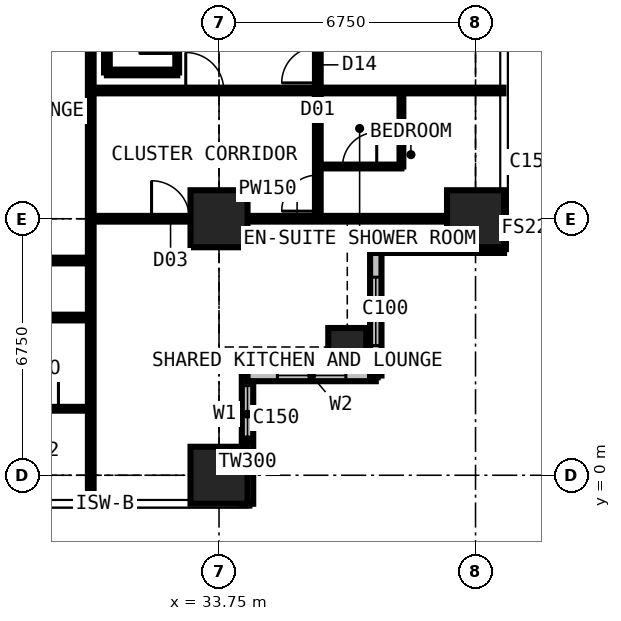
"""IFC4 building model, lengths in metres.
Left out: names, types, materials, properties, quantities, classifications, styles, units other than length and angle.
Written with IfcOpenShell. Run it as: python <this file> out.ifc"""

import sys

from ifc_helpers import new_model, si_unit, direction, frame, frame_2d, origin, origin_2d, place, context, subcontext, project, spatial, rectangle, extrude, element, fill, save


model = new_model("IFC4")
c1 = context("Model", 3, precision=1e-05, world=origin(), true_north=direction((0.0, 1.0)))
c2 = subcontext(c1, "Body", "Model", "MODEL_VIEW")
j1 = project(units=[si_unit("LENGTHUNIT", "METRE"), si_unit("PLANEANGLEUNIT", "RADIAN")], contexts=[c1])
p1 = place(None, origin())
s1 = spatial("IfcSite", under=j1, at=p1, CompositionType="ELEMENT")
p2 = place(p1, origin())
s2 = spatial("IfcBuilding", under=s1, at=p2, CompositionType="ELEMENT")
p3 = place(p2, frame((0.0, 0.0, 126.9)))
s3 = spatial("IfcBuildingStorey", under=s2, at=p3, CompositionType="ELEMENT", Elevation=126.9)
for number, where, z_axis, x_axis in (
    (1, (33.75, 0.0, 0.0), (0.0, 0.0, 1.0), (1.0, 0.0, 0.0)),
    (2, (33.75, 6.75, 0.0), (0.0, 0.0, 1.0), (1.0, 0.0, 0.0)),
):
    element("IfcColumn", number, at=place(p3, frame(where, z_axis=z_axis, x_axis=x_axis)), inside=s3, PredefinedType="COLUMN", context=c2, shape_type="SweptSolid", body=[
        extrude(rectangle(XDim=1.5, YDim=1.5, at=origin_2d()), origin(), (0.0, 0.0, 1.0), 3.6),
    ])
p4 = place(p3, frame((37.125, 3.375, 0.0), z_axis=(0.0, 0.0, 1.0), x_axis=(1.0, 0.0, 0.0)))
e3 = element("IfcColumn", 3, at=p4, inside=s3, PredefinedType="COLUMN", context=c2, shape_type="SweptSolid", body=[
    extrude(rectangle(XDim=1.0, YDim=1.0, at=origin_2d()), origin(), (0.0, 0.0, 1.0), 3.6),
])
p5 = place(p3, frame((40.5, 6.75, 0.0), z_axis=(0.0, 0.0, 1.0), x_axis=(1.0, 0.0, 0.0)))
e4 = element("IfcColumn", 4, at=p5, inside=s3, PredefinedType="COLUMN", context=c2, shape_type="SweptSolid", body=[
    extrude(rectangle(XDim=1.5, YDim=1.5, at=origin_2d()), origin(), (0.0, 0.0, 1.0), 3.6),
])
p6 = place(p3, frame((34.5, -0.75, 0.0), z_axis=(0.0, 0.0, 1.0), x_axis=(0.0, 1.0, 0.0)))
e5 = element("IfcWall", 5, at=p6, inside=s3, PredefinedType="SOLIDWALL", context=c2, shape_type="SweptSolid", body=[
    extrude(rectangle(XDim=3.375, YDim=0.3, at=frame_2d((1.688, 0.0))), origin(), (0.0, 0.0, 1.0), 3.375),
])
p7 = place(p6, frame((1.607, 0.0, 0.9)))
e6 = element("IfcOpeningElement", 6, at=p7, cuts=e5, PredefinedType="OPENING", context=c2, shape_type="SweptSolid", body=[
    extrude(rectangle(XDim=1.5, YDim=1.8, at=frame_2d((0.75, 0.9))), frame((0.0, 0.16, 0.0), z_axis=(0.0, -1.0, 0.0), x_axis=(1.0, 0.0, 0.0)), (0.0, 0.0, 1.0), 0.32),
])
p8 = place(p3, frame((34.5, 2.625, 0.0), z_axis=(0.0, 0.0, 1.0), x_axis=(1.0, 0.0, 0.0)))
e7 = element("IfcWall", 7, at=p8, inside=s3, PredefinedType="SOLIDWALL", context=c2, shape_type="SweptSolid", body=[
    extrude(rectangle(XDim=3.375, YDim=0.3, at=frame_2d((1.688, 0.0))), origin(), (0.0, 0.0, 1.0), 3.375),
])
p9 = place(p8, frame((0.788, 0.0, 0.6)))
e8 = element("IfcOpeningElement", 8, at=p9, cuts=e7, PredefinedType="OPENING", context=c2, shape_type="SweptSolid", body=[
    extrude(rectangle(XDim=1.8, YDim=2.1, at=frame_2d((0.9, 1.05))), frame((0.0, 0.16, 0.0), z_axis=(0.0, -1.0, 0.0), x_axis=(1.0, 0.0, 0.0)), (0.0, 0.0, 1.0), 0.32),
])
p10 = place(p3, frame((37.875, 2.625, 0.0), z_axis=(0.0, 0.0, 1.0), x_axis=(0.0, 1.0, 0.0)))
e9 = element("IfcWall", 9, at=p10, inside=s3, PredefinedType="SOLIDWALL", context=c2, shape_type="SweptSolid", body=[
    extrude(rectangle(XDim=3.375, YDim=0.3, at=frame_2d((1.688, 0.0))), origin(), (0.0, 0.0, 1.0), 3.375),
])
p11 = place(p10, frame((0.788, 0.0, 0.6)))
e10 = element("IfcOpeningElement", 10, at=p11, cuts=e9, PredefinedType="OPENING", context=c2, shape_type="SweptSolid", body=[
    extrude(rectangle(XDim=1.8, YDim=2.1, at=frame_2d((0.9, 1.05))), frame((0.0, 0.16, 0.0), z_axis=(0.0, -1.0, 0.0), x_axis=(1.0, 0.0, 0.0)), (0.0, 0.0, 1.0), 0.32),
])
p12 = place(p3, frame((37.875, 6.0, 0.0), z_axis=(0.0, 0.0, 1.0), x_axis=(1.0, 0.0, 0.0)))
e11 = element("IfcWall", 11, at=p12, inside=s3, PredefinedType="SOLIDWALL", context=c2, shape_type="SweptSolid", body=[
    extrude(rectangle(XDim=3.375, YDim=0.3, at=frame_2d((1.688, 0.0))), origin(), (0.0, 0.0, 1.0), 3.375),
])
p13 = place(p12, frame((0.268, 0.0, 0.9)))
e12 = element("IfcOpeningElement", 12, at=p13, cuts=e11, PredefinedType="OPENING", context=c2, shape_type="SweptSolid", body=[
    extrude(rectangle(XDim=1.5, YDim=1.8, at=frame_2d((0.75, 0.9))), frame((0.0, 0.16, 0.0), z_axis=(0.0, -1.0, 0.0), x_axis=(1.0, 0.0, 0.0)), (0.0, 0.0, 1.0), 0.32),
])
p14 = place(p3, frame((6.75, 4.15, 0.0), z_axis=(0.0, 0.0, 1.0), x_axis=(1.0, 0.0, 0.0)))
e13 = element("IfcWall", 13, at=p14, inside=s3, PredefinedType="PARTITIONING", context=c2, shape_type="SweptSolid", body=[
    extrude(rectangle(XDim=23.625, YDim=0.15, at=frame_2d((11.812, 0.0))), origin(), (0.0, 0.0, 1.0), 3.375),
])
p15 = place(p14, frame((2.85, 0.0, 0.0)))
e14 = element("IfcOpeningElement", 14, at=p15, cuts=e13, PredefinedType="OPENING", context=c2, shape_type="SweptSolid", body=[
    extrude(rectangle(XDim=1.0, YDim=2.2, at=frame_2d((0.5, 1.1))), frame((0.0, 0.085, 0.0), z_axis=(0.0, -1.0, 0.0), x_axis=(1.0, 0.0, 0.0)), (0.0, 0.0, 1.0), 0.17),
])
p16 = place(p14, frame((18.475, 0.0, 0.0)))
e15 = element("IfcOpeningElement", 15, at=p16, cuts=e13, PredefinedType="OPENING", context=c2, shape_type="SweptSolid", body=[
    extrude(rectangle(XDim=0.95, YDim=2.2, at=frame_2d((0.475, 1.1))), frame((0.0, 0.085, 0.0), z_axis=(0.0, -1.0, 0.0), x_axis=(1.0, 0.0, 0.0)), (0.0, 0.0, 1.0), 0.17),
])
p17 = place(p14, frame((11.725, 0.0, 0.0)))
e16 = element("IfcOpeningElement", 16, at=p17, cuts=e13, PredefinedType="OPENING", context=c2, shape_type="SweptSolid", body=[
    extrude(rectangle(XDim=0.95, YDim=2.2, at=frame_2d((0.475, 1.1))), frame((0.0, 0.085, 0.0), z_axis=(0.0, -1.0, 0.0), x_axis=(1.0, 0.0, 0.0)), (0.0, 0.0, 1.0), 0.17),
])
p18 = place(p14, frame((6.95, 0.0, 0.0)))
e17 = element("IfcOpeningElement", 17, at=p18, cuts=e13, PredefinedType="OPENING", context=c2, shape_type="SweptSolid", body=[
    extrude(rectangle(XDim=0.95, YDim=2.2, at=frame_2d((0.475, 1.1))), frame((0.0, 0.085, 0.0), z_axis=(0.0, -1.0, 0.0), x_axis=(1.0, 0.0, 0.0)), (0.0, 0.0, 1.0), 0.17),
])
p19 = place(p3, frame((22.988, 5.65, 0.0), z_axis=(0.0, 0.0, 1.0), x_axis=(1.0, 0.0, 0.0)))
e18 = element("IfcWall", 18, at=p19, inside=s3, PredefinedType="PARTITIONING", context=c2, shape_type="SweptSolid", body=[
    extrude(rectangle(XDim=7.387, YDim=0.15, at=frame_2d((3.694, 0.0))), origin(), (0.0, 0.0, 1.0), 3.375),
])
p20 = place(p19, frame((2.3, 0.0, 0.0)))
e19 = element("IfcOpeningElement", 19, at=p20, cuts=e18, PredefinedType="OPENING", context=c2, shape_type="SweptSolid", body=[
    extrude(rectangle(XDim=0.95, YDim=2.2, at=frame_2d((0.475, 1.1))), frame((0.0, 0.085, 0.0), z_axis=(0.0, -1.0, 0.0), x_axis=(1.0, 0.0, 0.0)), (0.0, 0.0, 1.0), 0.17),
])
p21 = place(p3, frame((27.775, 1.75, 0.0), z_axis=(0.0, 0.0, 1.0), x_axis=(1.0, 0.0, 0.0)))
e20 = element("IfcWall", 20, at=p21, inside=s3, PredefinedType="PARTITIONING", context=c2, shape_type="SweptSolid", body=[
    extrude(rectangle(XDim=2.6, YDim=0.1, at=frame_2d((1.3, 0.0))), origin(), (0.0, 0.0, 1.0), 3.375),
])
p22 = place(p21, frame((0.85, 0.0, 0.0)))
e21 = element("IfcOpeningElement", 21, at=p22, cuts=e20, PredefinedType="OPENING", context=c2, shape_type="SweptSolid", body=[
    extrude(rectangle(XDim=0.9, YDim=2.2, at=frame_2d((0.45, 1.1))), frame((0.0, 0.06, 0.0), z_axis=(0.0, -1.0, 0.0), x_axis=(1.0, 0.0, 0.0)), (0.0, 0.0, 1.0), 0.12),
])
p23 = place(p3, frame((30.375, -0.734, 0.0), z_axis=(0.0, 0.0, 1.0), x_axis=(0.0, 1.0, 0.0)))
e22 = element("IfcWall", 22, at=p23, inside=s3, PredefinedType="PARTITIONING", context=c2, shape_type="SweptSolid", body=[
    extrude(rectangle(XDim=12.034, YDim=0.15, at=frame_2d((6.017, 0.0))), origin(), (0.0, 0.0, 1.0), 3.375),
])
p24 = place(p3, frame((30.375, 6.75, 0.0), z_axis=(0.0, 0.0, 1.0), x_axis=(1.0, 0.0, 0.0)))
e23 = element("IfcWall", 23, at=p24, inside=s3, PredefinedType="PARTITIONING", context=c2, shape_type="SweptSolid", body=[
    extrude(rectangle(XDim=10.859, YDim=0.15, at=frame_2d((5.429, 0.0))), origin(), (0.0, 0.0, 1.0), 2.877),
])
p25 = place(p24, frame((1.6, 0.0, 0.0)))
e24 = element("IfcOpeningElement", 24, at=p25, cuts=e23, PredefinedType="OPENING", context=c2, shape_type="SweptSolid", body=[
    extrude(rectangle(XDim=1.0, YDim=2.2, at=frame_2d((0.5, 1.1))), frame((0.0, 0.085, 0.0), z_axis=(0.0, -1.0, 0.0), x_axis=(1.0, 0.0, 0.0)), (0.0, 0.0, 1.0), 0.17),
])
p26 = place(p3, frame((30.375, 10.125, 0.0), z_axis=(0.0, 0.0, 1.0), x_axis=(1.0, 0.0, 0.0)))
e25 = element("IfcWall", 25, at=p26, inside=s3, PredefinedType="PARTITIONING", context=c2, shape_type="SweptSolid", body=[
    extrude(rectangle(XDim=10.859, YDim=0.15, at=frame_2d((5.429, 0.0))), origin(), (0.0, 0.0, 1.0), 3.375),
])
p27 = place(p26, frame((2.5, 0.0, 0.0)))
e26 = element("IfcOpeningElement", 26, at=p27, cuts=e25, PredefinedType="OPENING", context=c2, shape_type="SweptSolid", body=[
    extrude(rectangle(XDim=1.0, YDim=2.2, at=frame_2d((0.5, 1.1))), frame((0.0, 0.085, 0.0), z_axis=(0.0, -1.0, 0.0), x_axis=(1.0, 0.0, 0.0)), (0.0, 0.0, 1.0), 0.17),
])
p28 = place(p3, frame((30.8, 10.6, 0.0), z_axis=(0.0, 0.0, 1.0), x_axis=(0.0, 1.0, 0.0)))
e27 = element("IfcWall", 27, at=p28, inside=s3, PredefinedType="PARTITIONING", context=c2, shape_type="SweptSolid", body=[
    extrude(rectangle(XDim=0.7, YDim=0.15, at=frame_2d((0.35, 0.0))), origin(), (0.0, 0.0, 1.0), 3.375),
])
p29 = place(p3, frame((30.8, 10.6, 0.0), z_axis=(0.0, 0.0, 1.0), x_axis=(1.0, 0.0, 0.0)))
e28 = element("IfcWall", 28, at=p29, inside=s3, PredefinedType="PARTITIONING", context=c2, shape_type="SweptSolid", body=[
    extrude(rectangle(XDim=1.85, YDim=0.15, at=frame_2d((0.925, 0.0))), origin(), (0.0, 0.0, 1.0), 3.375),
])
p30 = place(p3, frame((32.65, 10.6, 0.0), z_axis=(0.0, 0.0, 1.0), x_axis=(0.0, 1.0, 0.0)))
e29 = element("IfcWall", 29, at=p30, inside=s3, PredefinedType="SHEAR", context=c2, shape_type="SweptSolid", body=[
    extrude(rectangle(XDim=9.3, YDim=0.1, at=frame_2d((4.65, 0.0))), origin(), (0.0, 0.0, 1.0), 3.375),
])
p31 = place(p30, frame((0.5, 0.0, 0.0)))
e30 = element("IfcOpeningElement", 30, at=p31, cuts=e29, PredefinedType="OPENING", context=c2, shape_type="SweptSolid", body=[
    extrude(rectangle(XDim=1.0, YDim=2.2, at=frame_2d((0.5, 1.1))), frame((0.0, 0.06, 0.0), z_axis=(0.0, -1.0, 0.0), x_axis=(1.0, 0.0, 0.0)), (0.0, 0.0, 1.0), 0.12),
])
p32 = place(p3, frame((36.35, 6.75, 0.0), z_axis=(0.0, 0.0, 1.0), x_axis=(0.0, 1.0, 0.0)))
e31 = element("IfcWall", 31, at=p32, inside=s3, PredefinedType="PARTITIONING", context=c2, shape_type="SweptSolid", body=[
    extrude(rectangle(XDim=20.25, YDim=0.15, at=frame_2d((10.125, 0.0))), origin(), (0.0, 0.0, 1.0), 3.375),
])
p33 = place(p32, frame((0.2, 0.0, 0.0)))
e32 = element("IfcOpeningElement", 32, at=p33, cuts=e31, PredefinedType="OPENING", context=c2, shape_type="SweptSolid", body=[
    extrude(rectangle(XDim=0.95, YDim=2.2, at=frame_2d((0.475, 1.1))), frame((0.0, 0.085, 0.0), z_axis=(0.0, -1.0, 0.0), x_axis=(1.0, 0.0, 0.0)), (0.0, 0.0, 1.0), 0.17),
])
p34 = place(p32, frame((3.575, 0.0, 0.0)))
e33 = element("IfcOpeningElement", 33, at=p34, cuts=e31, PredefinedType="OPENING", context=c2, shape_type="SweptSolid", body=[
    extrude(rectangle(XDim=0.95, YDim=2.2, at=frame_2d((0.475, 1.1))), frame((0.0, 0.085, 0.0), z_axis=(0.0, -1.0, 0.0), x_axis=(1.0, 0.0, 0.0)), (0.0, 0.0, 1.0), 0.17),
])
p35 = place(p32, frame((7.0, 0.0, 0.0)))
e34 = element("IfcOpeningElement", 34, at=p35, cuts=e31, PredefinedType="OPENING", context=c2, shape_type="SweptSolid", body=[
    extrude(rectangle(XDim=0.95, YDim=2.2, at=frame_2d((0.475, 1.1))), frame((0.0, 0.085, 0.0), z_axis=(0.0, -1.0, 0.0), x_axis=(1.0, 0.0, 0.0)), (0.0, 0.0, 1.0), 0.17),
])
p36 = place(p32, frame((10.375, 0.0, 0.0)))
e35 = element("IfcOpeningElement", 35, at=p36, cuts=e31, PredefinedType="OPENING", context=c2, shape_type="SweptSolid", body=[
    extrude(rectangle(XDim=0.95, YDim=2.2, at=frame_2d((0.475, 1.1))), frame((0.0, 0.085, 0.0), z_axis=(0.0, -1.0, 0.0), x_axis=(1.0, 0.0, 0.0)), (0.0, 0.0, 1.0), 0.17),
])
p37 = place(p32, frame((13.75, 0.0, 0.0)))
e36 = element("IfcOpeningElement", 36, at=p37, cuts=e31, PredefinedType="OPENING", context=c2, shape_type="SweptSolid", body=[
    extrude(rectangle(XDim=0.95, YDim=2.2, at=frame_2d((0.475, 1.1))), frame((0.0, 0.085, 0.0), z_axis=(0.0, -1.0, 0.0), x_axis=(1.0, 0.0, 0.0)), (0.0, 0.0, 1.0), 0.17),
])
p38 = place(p32, frame((17.125, 0.0, 0.0)))
e37 = element("IfcOpeningElement", 37, at=p38, cuts=e31, PredefinedType="OPENING", context=c2, shape_type="SweptSolid", body=[
    extrude(rectangle(XDim=0.95, YDim=2.2, at=frame_2d((0.475, 1.1))), frame((0.0, 0.085, 0.0), z_axis=(0.0, -1.0, 0.0), x_axis=(1.0, 0.0, 0.0)), (0.0, 0.0, 1.0), 0.17),
])
p39 = place(p3, frame((36.35, 8.125, 0.0), z_axis=(0.0, 0.0, 1.0), x_axis=(1.0, 0.0, 0.0)))
e38 = element("IfcWall", 38, at=p39, inside=s3, PredefinedType="PARTITIONING", context=c2, shape_type="SweptSolid", body=[
    extrude(rectangle(XDim=2.2, YDim=0.1, at=frame_2d((1.1, 0.0))), origin(), (0.0, 0.0, 1.0), 3.375),
])
p40 = place(p39, frame((0.65, 0.0, 0.0)))
e39 = element("IfcOpeningElement", 39, at=p40, cuts=e38, PredefinedType="OPENING", context=c2, shape_type="SweptSolid", body=[
    extrude(rectangle(XDim=0.9, YDim=2.2, at=frame_2d((0.45, 1.1))), frame((0.0, 0.06, 0.0), z_axis=(0.0, -1.0, 0.0), x_axis=(1.0, 0.0, 0.0)), (0.0, 0.0, 1.0), 0.12),
])
p41 = place(p3, frame((38.55, 8.125, 0.0), z_axis=(0.0, 0.0, 1.0), x_axis=(0.0, 1.0, 0.0)))
e40 = element("IfcWall", 40, at=p41, inside=s3, PredefinedType="PARTITIONING", context=c2, shape_type="SweptSolid", body=[
    extrude(rectangle(XDim=2.0, YDim=0.1, at=frame_2d((1.0, 0.0))), origin(), (0.0, 0.0, 1.0), 3.375),
])
p42 = place(p7, origin())
e41 = element("IfcWindow", 41, at=p42, inside=s3, PartitioningType="SINGLE_PANEL", PredefinedType="WINDOW", context=c2, shape_type="SweptSolid", body=[
    extrude(rectangle(XDim=1.5, YDim=1.8, at=frame_2d((0.75, 0.9))), frame((0.0, 0.03, 0.0), z_axis=(0.0, -1.0, 0.0), x_axis=(1.0, 0.0, 0.0)), (0.0, 0.0, 1.0), 0.06),
])
fill(e6, e41)
p43 = place(p9, origin())
e42 = element("IfcWindow", 42, at=p43, inside=s3, PartitioningType="SINGLE_PANEL", PredefinedType="WINDOW", context=c2, shape_type="SweptSolid", body=[
    extrude(rectangle(XDim=1.8, YDim=2.1, at=frame_2d((0.9, 1.05))), frame((0.0, 0.03, 0.0), z_axis=(0.0, -1.0, 0.0), x_axis=(1.0, 0.0, 0.0)), (0.0, 0.0, 1.0), 0.06),
])
fill(e8, e42)
p44 = place(p11, origin())
e43 = element("IfcWindow", 43, at=p44, inside=s3, PartitioningType="SINGLE_PANEL", PredefinedType="WINDOW", context=c2, shape_type="SweptSolid", body=[
    extrude(rectangle(XDim=1.8, YDim=2.1, at=frame_2d((0.9, 1.05))), frame((0.0, 0.03, 0.0), z_axis=(0.0, -1.0, 0.0), x_axis=(1.0, 0.0, 0.0)), (0.0, 0.0, 1.0), 0.06),
])
fill(e10, e43)
p45 = place(p13, origin())
e44 = element("IfcWindow", 44, at=p45, inside=s3, PartitioningType="SINGLE_PANEL", PredefinedType="WINDOW", context=c2, shape_type="SweptSolid", body=[
    extrude(rectangle(XDim=1.5, YDim=1.8, at=frame_2d((0.75, 0.9))), frame((0.0, 0.03, 0.0), z_axis=(0.0, -1.0, 0.0), x_axis=(1.0, 0.0, 0.0)), (0.0, 0.0, 1.0), 0.06),
])
fill(e12, e44)
p46 = place(p22, origin())
e45 = element("IfcDoor", 45, at=p46, inside=s3, OperationType="SINGLE_SWING_RIGHT", PredefinedType="DOOR", context=c2, shape_type="SweptSolid", body=[
    extrude(rectangle(XDim=0.9, YDim=2.2, at=frame_2d((0.45, 1.1))), frame((0.0, 0.025, 0.0), z_axis=(0.0, -1.0, 0.0), x_axis=(1.0, 0.0, 0.0)), (0.0, 0.0, 1.0), 0.05),
])
fill(e21, e45)
p47 = place(p25, origin())
e46 = element("IfcDoor", 46, at=p47, inside=s3, OperationType="SINGLE_SWING_LEFT", PredefinedType="DOOR", context=c2, shape_type="SweptSolid", body=[
    extrude(rectangle(XDim=1.0, YDim=2.2, at=frame_2d((0.5, 1.1))), frame((0.0, 0.025, 0.0), z_axis=(0.0, -1.0, 0.0), x_axis=(1.0, 0.0, 0.0)), (0.0, 0.0, 1.0), 0.05),
])
fill(e24, e46)
p48 = place(p33, origin())
e47 = element("IfcDoor", 47, at=p48, inside=s3, OperationType="SINGLE_SWING_LEFT", PredefinedType="DOOR", context=c2, shape_type="SweptSolid", body=[
    extrude(rectangle(XDim=0.95, YDim=2.2, at=frame_2d((0.475, 1.1))), frame((0.0, 0.025, 0.0), z_axis=(0.0, -1.0, 0.0), x_axis=(1.0, 0.0, 0.0)), (0.0, 0.0, 1.0), 0.05),
])
fill(e32, e47)
p49 = place(p40, origin())
e48 = element("IfcDoor", 48, at=p49, inside=s3, OperationType="SINGLE_SWING_RIGHT", PredefinedType="DOOR", context=c2, shape_type="SweptSolid", body=[
    extrude(rectangle(XDim=0.9, YDim=2.2, at=frame_2d((0.45, 1.1))), frame((0.0, 0.025, 0.0), z_axis=(0.0, -1.0, 0.0), x_axis=(1.0, 0.0, 0.0)), (0.0, 0.0, 1.0), 0.05),
])
fill(e39, e48)
p50 = place(p27, origin())
e49 = element("IfcDoor", 49, at=p50, inside=s3, OperationType="SINGLE_SWING_LEFT", PredefinedType="DOOR", context=c2, shape_type="SweptSolid", body=[
    extrude(rectangle(XDim=1.0, YDim=2.2, at=frame_2d((0.5, 1.1))), frame((0.0, 0.025, 0.0), z_axis=(0.0, -1.0, 0.0), x_axis=(1.0, 0.0, 0.0)), (0.0, 0.0, 1.0), 0.05),
])
fill(e26, e49)
p51 = place(p34, origin())
e50 = element("IfcDoor", 50, at=p51, inside=s3, OperationType="SINGLE_SWING_LEFT", PredefinedType="DOOR", context=c2, shape_type="SweptSolid", body=[
    extrude(rectangle(XDim=0.95, YDim=2.2, at=frame_2d((0.475, 1.1))), frame((0.0, 0.025, 0.0), z_axis=(0.0, -1.0, 0.0), x_axis=(1.0, 0.0, 0.0)), (0.0, 0.0, 1.0), 0.05),
])
fill(e33, e50)
p52 = place(p31, origin())
e51 = element("IfcDoor", 51, at=p52, inside=s3, OperationType="SINGLE_SWING_LEFT", PredefinedType="DOOR", context=c2, shape_type="SweptSolid", body=[
    extrude(rectangle(XDim=1.0, YDim=2.2, at=frame_2d((0.5, 1.1))), frame((0.0, 0.025, 0.0), z_axis=(0.0, -1.0, 0.0), x_axis=(1.0, 0.0, 0.0)), (0.0, 0.0, 1.0), 0.05),
])
fill(e30, e51)
save(model, sys.argv[1])
